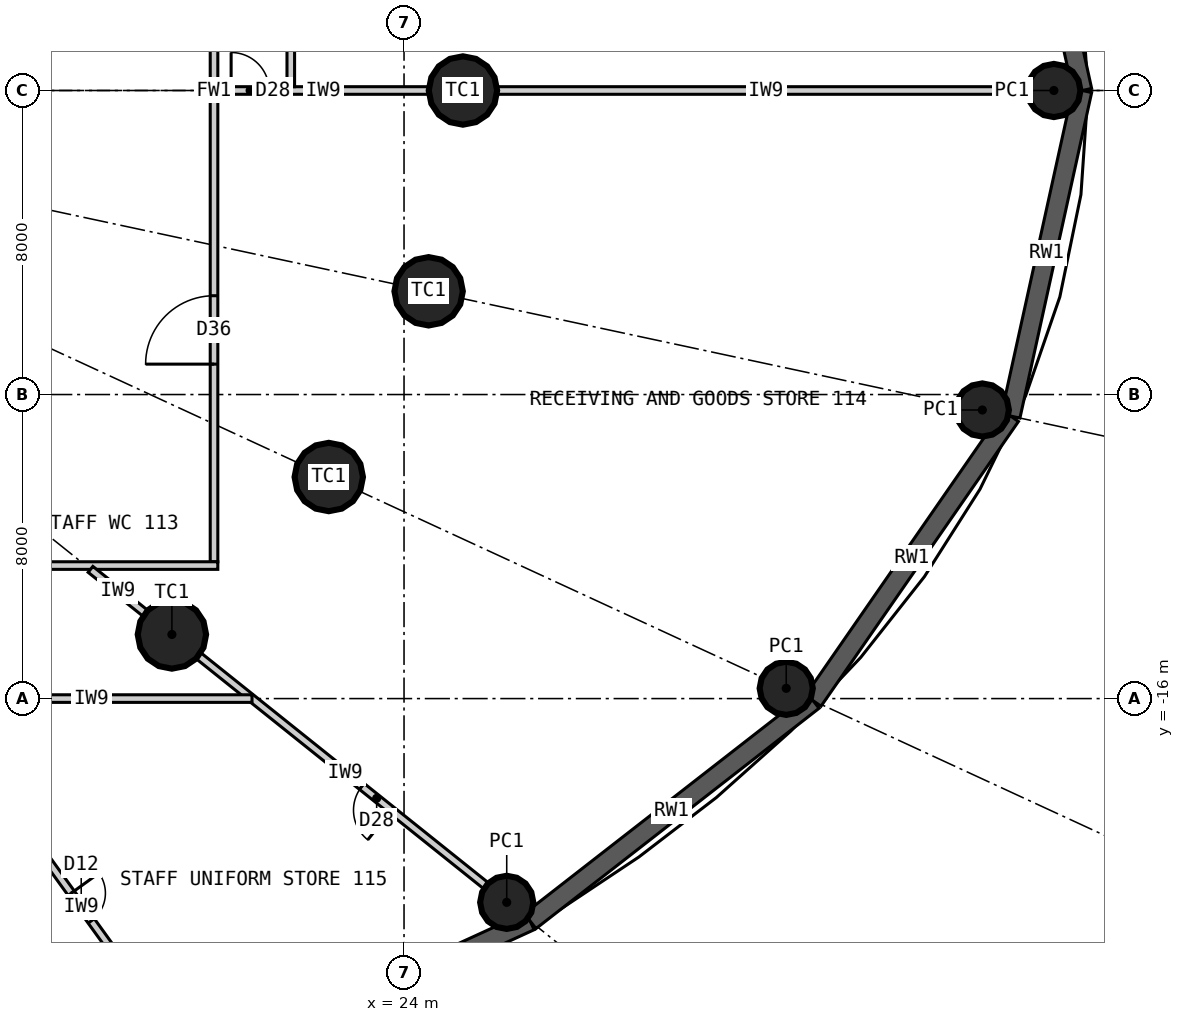
"""IFC4 building model, lengths in metres.
Left out: names, types, materials, properties, quantities, classifications, styles, units other than length and angle.
Written with IfcOpenShell. Run it as: python <this file> out.ifc"""

import sys

from ifc_helpers import new_model, si_unit, direction, frame, frame_2d, origin, origin_2d, place, context, subcontext, project, spatial, rectangle, circle, extrude, element, fill, save


model = new_model("IFC4")
c1 = context("Model", 3, precision=1e-05, world=origin(), true_north=direction((0.0, 1.0)))
c2 = subcontext(c1, "Body", "Model", "MODEL_VIEW")
j1 = project(units=[si_unit("LENGTHUNIT", "METRE"), si_unit("PLANEANGLEUNIT", "RADIAN")], contexts=[c1])
p1 = place(None, origin())
s1 = spatial("IfcSite", under=j1, at=p1, CompositionType="ELEMENT")
p2 = place(p1, origin())
s2 = spatial("IfcBuilding", under=s1, at=p2, CompositionType="ELEMENT")
p3 = place(p2, frame((0.0, 0.0, -6.0)))
s3 = spatial("IfcBuildingStorey", under=s2, at=p3, CompositionType="ELEMENT", Elevation=-6.0)
for number, where, z_axis, x_axis in (
    (1, (25.55, 0.0, 0.0), (0.0, 0.0, 1.0), (1.0, 0.0, 0.0)),
    (2, (17.892, -14.313, 0.0), (0.0, 0.0, 1.0), (1.0, 0.0, 0.0)),
    (3, (22.019, -10.17, 0.0), (0.0, 0.0, 1.0), (1.0, 0.0, 0.0)),
    (4, (24.647, -5.283, 0.0), (0.0, 0.0, 1.0), (1.0, 0.0, 0.0)),
):
    element("IfcColumn", number, at=place(p3, frame(where, z_axis=z_axis, x_axis=x_axis)), inside=s3, PredefinedType="COLUMN", context=c2, shape_type="SweptSolid", body=[
        extrude(circle(Radius=0.9, at=origin_2d()), origin(), (0.0, 0.0, 1.0), 6.0),
    ])
for number, where, z_axis, x_axis in (
    (5, (41.1, 0.0, 0.0), (0.0, 0.0, 1.0), (1.0, 0.0, 0.0)),
    (6, (26.702, -21.362, 0.0), (0.0, 0.0, 1.0), (1.0, 0.0, 0.0)),
    (7, (34.057, -15.73, 0.0), (0.0, 0.0, 1.0), (1.0, 0.0, 0.0)),
    (8, (39.218, -8.407, 0.0), (0.0, 0.0, 1.0), (1.0, 0.0, 0.0)),
):
    element("IfcColumn", number, at=place(p3, frame(where, z_axis=z_axis, x_axis=x_axis)), inside=s3, PredefinedType="COLUMN", context=c2, shape_type="SweptSolid", body=[
        extrude(circle(Radius=0.7, at=origin_2d()), origin(), (0.0, 0.0, 1.0), 6.0),
    ])
p4 = place(p3, frame((41.85, 0.0, 0.0), z_axis=(0.0, 0.0, 1.0), x_axis=(-0.215170782675, 0.976576435454, 0.0)))
e9 = element("IfcWall", 9, at=p4, inside=s3, PredefinedType="SOLIDWALL", context=c2, shape_type="SweptSolid", body=[
    extrude(rectangle(XDim=8.772, YDim=0.5, at=frame_2d((4.386, 0.0))), origin(), (0.0, 0.0, 1.0), 5.75),
])
p5 = place(p3, frame((18.641, -25.83, 0.0), z_axis=(0.0, 0.0, 1.0), x_axis=(0.909171365198, 0.416422176047, 0.0)))
e10 = element("IfcWall", 10, at=p5, inside=s3, PredefinedType="SOLIDWALL", context=c2, shape_type="SweptSolid", body=[
    extrude(rectangle(XDim=9.545, YDim=0.5, at=frame_2d((4.772, 0.0))), origin(), (0.0, 0.0, 1.0), 5.75),
])
p6 = place(p3, frame((27.319, -21.855, 0.0), z_axis=(0.0, 0.0, 1.0), x_axis=(0.789189230142, 0.614150111152, 0.0)))
e11 = element("IfcWall", 11, at=p6, inside=s3, PredefinedType="SOLIDWALL", context=c2, shape_type="SweptSolid", body=[
    extrude(rectangle(XDim=9.438, YDim=0.5, at=frame_2d((4.719, 0.0))), origin(), (0.0, 0.0, 1.0), 5.75),
])
p7 = place(p3, frame((34.768, -16.059, 0.0), z_axis=(0.0, 0.0, 1.0), x_axis=(0.569815549616, 0.821772620264, 0.0)))
e12 = element("IfcWall", 12, at=p7, inside=s3, PredefinedType="SOLIDWALL", context=c2, shape_type="SweptSolid", body=[
    extrude(rectangle(XDim=9.117, YDim=0.5, at=frame_2d((4.559, 0.0))), origin(), (0.0, 0.0, 1.0), 5.75),
])
p8 = place(p3, frame((39.963, -8.566, 0.0), z_axis=(0.0, 0.0, 1.0), x_axis=(0.215170782675, 0.976576435454, 0.0)))
e13 = element("IfcWall", 13, at=p8, inside=s3, PredefinedType="SOLIDWALL", context=c2, shape_type="SweptSolid", body=[
    extrude(rectangle(XDim=8.772, YDim=0.5, at=frame_2d((4.386, 0.0))), origin(), (0.0, 0.0, 1.0), 5.75),
])
p9 = place(p3, frame((19.0, -12.4, 0.0), z_axis=(0.0, 0.0, 1.0), x_axis=(0.0, 1.0, 0.0)))
e14 = element("IfcWall", 14, at=p9, inside=s3, PredefinedType="PARTITIONING", context=c2, shape_type="SweptSolid", body=[
    extrude(rectangle(XDim=24.8, YDim=0.2, at=frame_2d((12.4, 0.0))), origin(), (0.0, 0.0, 1.0), 5.75),
])
p10 = place(p9, frame((17.8, 0.0, 0.0)))
e15 = element("IfcOpeningElement", 15, at=p10, cuts=e14, PredefinedType="OPENING", context=c2, shape_type="SweptSolid", body=[
    extrude(rectangle(XDim=1.8, YDim=2.4, at=frame_2d((0.9, 1.2))), frame((0.0, 0.11, 0.0), z_axis=(0.0, -1.0, 0.0), x_axis=(1.0, 0.0, 0.0)), (0.0, 0.0, 1.0), 0.22),
])
p11 = place(p9, frame((5.2, 0.0, 0.0)))
e16 = element("IfcOpeningElement", 16, at=p11, cuts=e14, PredefinedType="OPENING", context=c2, shape_type="SweptSolid", body=[
    extrude(rectangle(XDim=1.8, YDim=2.4, at=frame_2d((0.9, 1.2))), frame((0.0, 0.11, 0.0), z_axis=(0.0, -1.0, 0.0), x_axis=(1.0, 0.0, 0.0)), (0.0, 0.0, 1.0), 0.22),
])
p12 = place(p3, frame((19.1, -12.5, 0.0), z_axis=(0.0, 0.0, 1.0), x_axis=(-1.0, 0.0, 0.0)))
e17 = element("IfcWall", 17, at=p12, inside=s3, PredefinedType="PARTITIONING", context=c2, shape_type="SweptSolid", body=[
    extrude(rectangle(XDim=38.2, YDim=0.2, at=frame_2d((19.1, 0.0))), origin(), (0.0, 0.0, 1.0), 5.75),
])
p13 = place(p12, frame((32.297, 0.0, 0.0)))
e18 = element("IfcOpeningElement", 18, at=p13, cuts=e17, PredefinedType="OPENING", context=c2, shape_type="SweptSolid", body=[
    extrude(rectangle(XDim=1.8, YDim=2.4, at=frame_2d((0.9, 1.2))), frame((0.0, 0.11, 0.0), z_axis=(0.0, -1.0, 0.0), x_axis=(1.0, 0.0, 0.0)), (0.0, 0.0, 1.0), 0.22),
])
p14 = place(p12, frame((19.079, 0.0, 0.0)))
e19 = element("IfcOpeningElement", 19, at=p14, cuts=e17, PredefinedType="OPENING", context=c2, shape_type="SweptSolid", body=[
    extrude(rectangle(XDim=1.8, YDim=2.4, at=frame_2d((0.9, 1.2))), frame((0.0, 0.11, 0.0), z_axis=(0.0, -1.0, 0.0), x_axis=(1.0, 0.0, 0.0)), (0.0, 0.0, 1.0), 0.22),
])
p15 = place(p12, frame((11.843, 0.0, 0.0)))
e20 = element("IfcOpeningElement", 20, at=p15, cuts=e17, PredefinedType="OPENING", context=c2, shape_type="SweptSolid", body=[
    extrude(rectangle(XDim=1.2, YDim=2.2, at=frame_2d((0.6, 1.1))), frame((0.0, 0.11, 0.0), z_axis=(0.0, -1.0, 0.0), x_axis=(1.0, 0.0, 0.0)), (0.0, 0.0, 1.0), 0.22),
])
p16 = place(p12, frame((6.178, 0.0, 0.0)))
e21 = element("IfcOpeningElement", 21, at=p16, cuts=e17, PredefinedType="OPENING", context=c2, shape_type="SweptSolid", body=[
    extrude(rectangle(XDim=1.0, YDim=2.2, at=frame_2d((0.5, 1.1))), frame((0.0, 0.11, 0.0), z_axis=(0.0, -1.0, 0.0), x_axis=(1.0, 0.0, 0.0)), (0.0, 0.0, 1.0), 0.22),
])
p17 = place(p12, frame((25.979, 0.0, 0.0)))
e22 = element("IfcOpeningElement", 22, at=p17, cuts=e17, PredefinedType="OPENING", context=c2, shape_type="SweptSolid", body=[
    extrude(rectangle(XDim=1.8, YDim=2.4, at=frame_2d((0.9, 1.2))), frame((0.0, 0.11, 0.0), z_axis=(0.0, -1.0, 0.0), x_axis=(1.0, 0.0, 0.0)), (0.0, 0.0, 1.0), 0.22),
])
p18 = place(p3, frame((19.1, 0.0, 0.0), z_axis=(0.0, 0.0, 1.0), x_axis=(1.0, 0.0, 0.0)))
e23 = element("IfcWall", 23, at=p18, inside=s3, PredefinedType="PARTITIONING", context=c2, shape_type="SweptSolid", body=[
    extrude(rectangle(XDim=5.55, YDim=0.2, at=frame_2d((2.775, 0.0))), origin(), (0.0, 0.0, 1.0), 4.85),
])
p19 = place(p18, frame((0.35, 0.0, 0.0)))
e24 = element("IfcOpeningElement", 24, at=p19, cuts=e23, PredefinedType="OPENING", context=c2, shape_type="SweptSolid", body=[
    extrude(rectangle(XDim=1.0, YDim=2.2, at=frame_2d((0.5, 1.1))), frame((0.0, 0.11, 0.0), z_axis=(0.0, -1.0, 0.0), x_axis=(1.0, 0.0, 0.0)), (0.0, 0.0, 1.0), 0.22),
])
p20 = place(p3, frame((26.45, 0.0, 0.0), z_axis=(0.0, 0.0, 1.0), x_axis=(1.0, 0.0, 0.0)))
e25 = element("IfcWall", 25, at=p20, inside=s3, PredefinedType="PARTITIONING", context=c2, shape_type="SweptSolid", body=[
    extrude(rectangle(XDim=14.15, YDim=0.2, at=frame_2d((7.075, 0.0))), origin(), (0.0, 0.0, 1.0), 4.85),
])
p21 = place(p3, frame((13.118, -18.176, 0.0), z_axis=(0.0, 0.0, 1.0), x_axis=(0.585204349301, -0.810885854828, 0.0)))
e26 = element("IfcWall", 26, at=p21, inside=s3, PredefinedType="PARTITIONING", context=c2, shape_type="SweptSolid", body=[
    extrude(rectangle(XDim=8.161, YDim=0.2, at=frame_2d((4.081, 0.0))), origin(), (0.0, 0.0, 1.0), 4.85),
])
p22 = place(p21, frame((3.631, 0.0, 0.0)))
e27 = element("IfcOpeningElement", 27, at=p22, cuts=e26, PredefinedType="OPENING", context=c2, shape_type="SweptSolid", body=[
    extrude(rectangle(XDim=0.9, YDim=2.2, at=frame_2d((0.45, 1.1))), frame((0.0, 0.11, 0.0), z_axis=(0.0, -1.0, 0.0), x_axis=(1.0, 0.0, 0.0)), (0.0, 0.0, 1.0), 0.22),
])
p23 = place(p3, frame((15.75, -12.6, 0.0), z_axis=(0.0, 0.0, 1.0), x_axis=(0.780881734892, -0.6246788904, 0.0)))
e28 = element("IfcWall", 28, at=p23, inside=s3, PredefinedType="PARTITIONING", context=c2, shape_type="SweptSolid", body=[
    extrude(rectangle(XDim=1.843, YDim=0.2, at=frame_2d((0.921, 0.0))), origin(), (0.0, 0.0, 1.0), 4.9),
])
p24 = place(p3, frame((18.594, -14.875, 0.0), z_axis=(0.0, 0.0, 1.0), x_axis=(0.780868809443, -0.624695047554, 0.0)))
e29 = element("IfcWall", 29, at=p24, inside=s3, PredefinedType="PARTITIONING", context=c2, shape_type="SweptSolid", body=[
    extrude(rectangle(XDim=9.883, YDim=0.2, at=frame_2d((4.941, 0.0))), origin(), (0.0, 0.0, 1.0), 4.85),
])
p25 = place(p24, frame((5.5, 0.0, 0.0)))
e30 = element("IfcOpeningElement", 30, at=p25, cuts=e29, PredefinedType="OPENING", context=c2, shape_type="SweptSolid", body=[
    extrude(rectangle(XDim=1.0, YDim=2.2, at=frame_2d((0.5, 1.1))), frame((0.0, 0.11, 0.0), z_axis=(0.0, -1.0, 0.0), x_axis=(1.0, 0.0, 0.0)), (0.0, 0.0, 1.0), 0.22),
])
p26 = place(p3, frame((21.02, 0.1, 0.0), z_axis=(0.0, 0.0, 1.0), x_axis=(0.0, 1.0, 0.0)))
e31 = element("IfcWall", 31, at=p26, inside=s3, PredefinedType="PARTITIONING", context=c2, shape_type="SweptSolid", body=[
    extrude(rectangle(XDim=10.4, YDim=0.2, at=frame_2d((5.2, 0.0))), origin(), (0.0, 0.0, 1.0), 5.75),
])
p27 = place(p26, frame((1.6, 0.0, 0.0)))
e32 = element("IfcOpeningElement", 32, at=p27, cuts=e31, PredefinedType="OPENING", context=c2, shape_type="SweptSolid", body=[
    extrude(rectangle(XDim=1.0, YDim=2.2, at=frame_2d((0.5, 1.1))), frame((0.0, 0.11, 0.0), z_axis=(0.0, -1.0, 0.0), x_axis=(1.0, 0.0, 0.0)), (0.0, 0.0, 1.0), 0.22),
])
p28 = place(p26, frame((7.8, 0.0, 0.0)))
e33 = element("IfcOpeningElement", 33, at=p28, cuts=e31, PredefinedType="OPENING", context=c2, shape_type="SweptSolid", body=[
    extrude(rectangle(XDim=1.0, YDim=2.2, at=frame_2d((0.5, 1.1))), frame((0.0, 0.11, 0.0), z_axis=(0.0, -1.0, 0.0), x_axis=(1.0, 0.0, 0.0)), (0.0, 0.0, 1.0), 0.22),
])
p29 = place(p3, frame((11.547, -16.0, 0.0), z_axis=(0.0, 0.0, 1.0), x_axis=(1.0, 0.0, 0.0)))
e34 = element("IfcWall", 34, at=p29, inside=s3, PredefinedType="PARTITIONING", context=c2, shape_type="SweptSolid", body=[
    extrude(rectangle(XDim=8.453, YDim=0.2, at=frame_2d((4.227, 0.0))), origin(), (0.0, 0.0, 1.0), 5.75),
])
p30 = place(p11, origin())
e35 = element("IfcDoor", 35, at=p30, inside=s3, OperationType="DOUBLE_DOOR_DOUBLE_SWING", PredefinedType="DOOR", context=c2, shape_type="SweptSolid", body=[
    extrude(rectangle(XDim=1.8, YDim=2.4, at=frame_2d((0.9, 1.2))), frame((0.0, 0.025, 0.0), z_axis=(0.0, -1.0, 0.0), x_axis=(1.0, 0.0, 0.0)), (0.0, 0.0, 1.0), 0.05),
])
fill(e16, e35)
p31 = place(p19, origin())
e36 = element("IfcDoor", 36, at=p31, inside=s3, OperationType="SINGLE_SWING_LEFT", PredefinedType="DOOR", context=c2, shape_type="SweptSolid", body=[
    extrude(rectangle(XDim=1.0, YDim=2.2, at=frame_2d((0.5, 1.1))), frame((0.0, 0.025, 0.0), z_axis=(0.0, -1.0, 0.0), x_axis=(1.0, 0.0, 0.0)), (0.0, 0.0, 1.0), 0.05),
])
fill(e24, e36)
p32 = place(p22, origin())
e37 = element("IfcDoor", 37, at=p32, inside=s3, OperationType="SINGLE_SWING_LEFT", PredefinedType="DOOR", context=c2, shape_type="SweptSolid", body=[
    extrude(rectangle(XDim=0.9, YDim=2.2, at=frame_2d((0.45, 1.1))), frame((0.0, 0.025, 0.0), z_axis=(0.0, -1.0, 0.0), x_axis=(1.0, 0.0, 0.0)), (0.0, 0.0, 1.0), 0.05),
])
fill(e27, e37)
p33 = place(p25, origin())
e38 = element("IfcDoor", 38, at=p33, inside=s3, OperationType="SINGLE_SWING_RIGHT", PredefinedType="DOOR", context=c2, shape_type="SweptSolid", body=[
    extrude(rectangle(XDim=1.0, YDim=2.2, at=frame_2d((0.5, 1.1))), frame((0.0, 0.025, 0.0), z_axis=(0.0, -1.0, 0.0), x_axis=(1.0, 0.0, 0.0)), (0.0, 0.0, 1.0), 0.05),
])
fill(e30, e38)
save(model, sys.argv[1])
